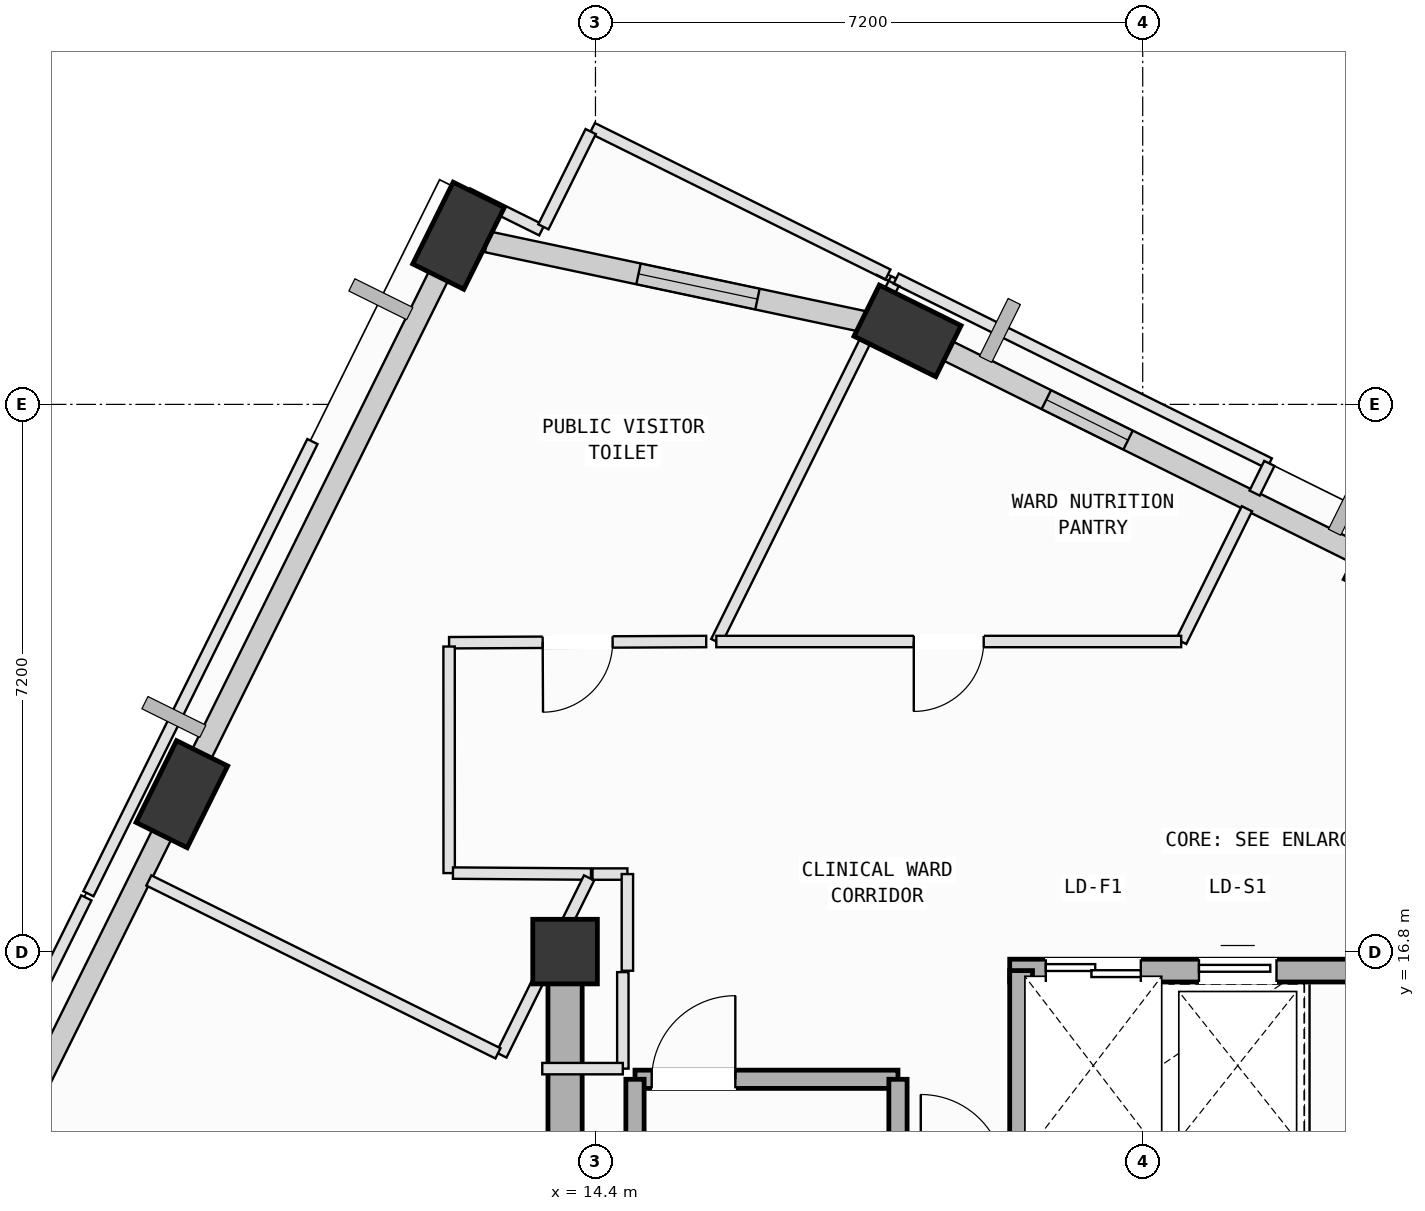
"""IFC4 building model, lengths in metres.
Left out: names, types, materials, properties, quantities, classifications, styles, units other than length and angle.
Written with IfcOpenShell. Run it as: python <this file> out.ifc"""

import sys

from ifc_helpers import new_model, si_unit, direction, frame, frame_2d, origin, origin_2d, place, context, subcontext, project, spatial, rectangle, extrude, element, fill, save


model = new_model("IFC4")
c1 = context("Model", 3, precision=1e-05, world=origin(), true_north=direction((0.0, 1.0)))
c2 = subcontext(c1, "Body", "Model", "MODEL_VIEW")
j1 = project(units=[si_unit("LENGTHUNIT", "METRE"), si_unit("PLANEANGLEUNIT", "RADIAN")], contexts=[c1])
p1 = place(None, origin())
s1 = spatial("IfcSite", under=j1, at=p1, CompositionType="ELEMENT")
p2 = place(p1, origin())
s2 = spatial("IfcBuilding", under=s1, at=p2, CompositionType="ELEMENT")
p3 = place(p2, frame((0.0, 0.0, 296.6)))
s3 = spatial("IfcBuildingStorey", under=s2, at=p3, CompositionType="ELEMENT", Elevation=296.6)
p4 = place(p3, frame((14.0, 16.8, 0.0), z_axis=(0.0, 0.0, 1.0), x_axis=(1.0, 0.0, 0.0)))
e1 = element("IfcColumn", 1, at=p4, inside=s3, PredefinedType="COLUMN", context=c2, shape_type="SweptSolid", body=[
    extrude(rectangle(XDim=0.85, YDim=0.85, at=origin_2d()), origin(), (0.0, 0.0, 1.0), 4.0),
])
p5 = place(p3, frame((18.506, 24.967, 0.002), z_axis=(-0.000182915695, -0.062435223748, 0.998049001491), x_axis=(-0.894797781835, 0.445610775748, 0.027712202396)))
e2 = element("IfcColumn", 2, at=p5, inside=s3, PredefinedType="COLUMN", context=c2, shape_type="SweptSolid", body=[
    extrude(rectangle(XDim=1.2, YDim=0.75, at=origin_2d()), origin(), (0.0, 0.0, 1.0), 4.004),
])
p6 = place(p3, frame((12.598, 26.219, 0.002), z_axis=(-0.005173080286, -0.086786029269, 0.996213543556), x_axis=(0.496184468369, 0.864714681818, 0.077906947039)))
e3 = element("IfcColumn", 3, at=p6, inside=s3, PredefinedType="COLUMN", context=c2, shape_type="SweptSolid", body=[
    extrude(rectangle(XDim=1.2, YDim=0.75, at=origin_2d()), origin(), (0.0, 0.0, 1.0), 4.011),
])
p7 = place(p3, frame((8.958, 18.871, 0.002), z_axis=(0.025274890119, -0.101342588264, 0.994530471998), x_axis=(0.215002324818, 0.972118317881, 0.093594745379)))
e4 = element("IfcColumn", 4, at=p7, inside=s3, PredefinedType="COLUMN", context=c2, shape_type="SweptSolid", body=[
    extrude(rectangle(XDim=1.2, YDim=0.75, at=origin_2d()), origin(), (0.0, 0.0, 1.0), 4.018),
])
p8 = place(p3, frame((18.897, 24.773, 0.0), z_axis=(0.0, 0.0, 1.0), x_axis=(0.896108153049, -0.443835755702, 0.0)))
e5 = element("IfcWall", 5, at=p8, inside=s3, PredefinedType="SOLIDWALL", context=c2, shape_type="SweptSolid", body=[
    extrude(rectangle(XDim=6.424, YDim=0.28, at=frame_2d((3.212, 0.0))), origin(), (0.0, 0.0, 1.0), 3.265),
])
p9 = place(p8, frame((1.601, 0.0, 0.75)))
e6 = element("IfcOpeningElement", 6, at=p9, cuts=e5, PredefinedType="OPENING", context=c2, shape_type="SweptSolid", body=[
    extrude(rectangle(XDim=1.2, YDim=1.75, at=frame_2d((0.6, 0.875))), frame((0.0, 0.15, 0.0), z_axis=(0.0, -1.0, 0.0), x_axis=(1.0, 0.0, 0.0)), (0.0, 0.0, 1.0), 0.3),
])
p10 = place(p3, frame((12.974, 26.14, 0.0), z_axis=(0.0, 0.0, 1.0), x_axis=(0.978261588189, -0.207374697284, 0.0)))
e7 = element("IfcWall", 7, at=p10, inside=s3, PredefinedType="SOLIDWALL", context=c2, shape_type="SweptSolid", body=[
    extrude(rectangle(XDim=5.302, YDim=0.28, at=frame_2d((2.651, 0.0))), origin(), (0.0, 0.0, 1.0), 3.265),
])
p11 = place(p10, frame((2.037, 0.0, 0.75)))
e8 = element("IfcOpeningElement", 8, at=p11, cuts=e7, PredefinedType="OPENING", context=c2, shape_type="SweptSolid", body=[
    extrude(rectangle(XDim=1.6, YDim=1.95, at=frame_2d((0.8, 0.975))), frame((0.0, 0.15, 0.0), z_axis=(0.0, -1.0, 0.0), x_axis=(1.0, 0.0, 0.0)), (0.0, 0.0, 1.0), 0.3),
])
p12 = place(p3, frame((9.053, 19.062, 0.0), z_axis=(0.0, 0.0, 1.0), x_axis=(0.443860814278, 0.896095741285, 0.0)))
e9 = element("IfcWall", 9, at=p12, inside=s3, PredefinedType="SOLIDWALL", context=c2, shape_type="SweptSolid", body=[
    extrude(rectangle(XDim=7.434, YDim=0.28, at=frame_2d((3.717, 0.0))), origin(), (0.0, 0.0, 1.0), 3.265),
])
p13 = place(p3, frame((5.399, 11.686, 0.0), z_axis=(0.0, 0.0, 1.0), x_axis=(0.443844166841, 0.896103987025, 0.0)))
e10 = element("IfcWall", 10, at=p13, inside=s3, PredefinedType="SOLIDWALL", context=c2, shape_type="SweptSolid", body=[
    extrude(rectangle(XDim=7.485, YDim=0.28, at=frame_2d((3.742, 0.0))), origin(), (0.0, 0.0, 1.0), 3.265),
])
p14 = place(p3, frame((14.92, 15.12, 0.0), z_axis=(0.0, 0.0, 1.0), x_axis=(1.0, 0.0, 0.0)))
e11 = element("IfcWall", 11, at=p14, inside=s3, PredefinedType="SOLIDWALL", context=c2, shape_type="SweptSolid", body=[
    extrude(rectangle(XDim=3.46, YDim=0.24, at=frame_2d((1.73, 0.0))), origin(), (0.0, 0.0, 1.0), 3.78),
])
p15 = place(p14, frame((0.22, 0.0, 0.0)))
e12 = element("IfcOpeningElement", 12, at=p15, cuts=e11, PredefinedType="OPENING", context=c2, shape_type="SweptSolid", body=[
    extrude(rectangle(XDim=1.1, YDim=2.15, at=frame_2d((0.55, 1.075))), frame((0.0, 0.13, 0.0), z_axis=(0.0, -1.0, 0.0), x_axis=(1.0, 0.0, 0.0)), (0.0, 0.0, 1.0), 0.26),
])
for number, where, z_axis, x_axis in (
    (13, (18.38, 15.12, 0.0), (0.0, 0.0, 1.0), (0.0, -1.0, 0.0)),
    (14, (14.92, 8.025, 0.0), (0.0, 0.0, 1.0), (0.0, 1.0, 0.0)),
):
    element("IfcWall", number, at=place(p3, frame(where, z_axis=z_axis, x_axis=x_axis)), inside=s3, PredefinedType="SOLIDWALL", context=c2, shape_type="SweptSolid", body=[
        extrude(rectangle(XDim=7.095, YDim=0.24, at=frame_2d((3.548, 0.0))), origin(), (0.0, 0.0, 1.0), 3.78),
    ])
p16 = place(p3, frame((14.0, 16.8, 0.0), z_axis=(0.0, 0.0, 1.0), x_axis=(0.0, -1.0, 0.0)))
e15 = element("IfcWall", 15, at=p16, inside=s3, PredefinedType="SHEAR", context=c2, shape_type="SweptSolid", body=[
    extrude(rectangle(XDim=9.0, YDim=0.45, at=frame_2d((4.5, 0.0))), origin(), (0.0, 0.0, 1.0), 3.78),
])
p17 = place(p3, frame((19.85, 16.55, 0.0), z_axis=(0.0, 0.0, 1.0), x_axis=(1.0, 0.0, 0.0)))
e16 = element("IfcWall", 16, at=p17, inside=s3, PredefinedType="SOLIDWALL", context=c2, shape_type="SweptSolid", body=[
    extrude(rectangle(XDim=4.525, YDim=0.3, at=frame_2d((2.262, 0.0))), origin(), (0.0, 0.0, 1.0), 3.78),
])
p18 = place(p17, frame((0.475, 0.0, 0.0)))
e17 = element("IfcOpeningElement", 17, at=p18, cuts=e16, PredefinedType="OPENING", context=c2, shape_type="SweptSolid", body=[
    extrude(rectangle(XDim=1.25, YDim=2.18, at=frame_2d((0.625, 1.09))), frame((0.0, 0.16, 0.0), z_axis=(0.0, -1.0, 0.0), x_axis=(1.0, 0.0, 0.0)), (0.0, 0.0, 1.0), 0.32),
])
p19 = place(p17, frame((2.49, 0.0, 0.0)))
e18 = element("IfcOpeningElement", 18, at=p19, cuts=e16, PredefinedType="OPENING", context=c2, shape_type="SweptSolid", body=[
    extrude(rectangle(XDim=1.02, YDim=2.12, at=frame_2d((0.51, 1.06))), frame((0.0, 0.16, 0.0), z_axis=(0.0, -1.0, 0.0), x_axis=(1.0, 0.0, 0.0)), (0.0, 0.0, 1.0), 0.32),
])
p20 = place(p3, frame((20.0, 13.82, 0.0), z_axis=(0.0, 0.0, 1.0), x_axis=(0.0, 1.0, 0.0)))
e19 = element("IfcWall", 19, at=p20, inside=s3, PredefinedType="SOLIDWALL", context=c2, shape_type="SweptSolid", body=[
    extrude(rectangle(XDim=2.73, YDim=0.3, at=frame_2d((1.365, 0.0))), origin(), (0.0, 0.0, 1.0), 3.78),
])
p21 = place(p3, frame((15.99, 20.88, 0.0), z_axis=(0.0, 0.0, 1.0), x_axis=(0.443946777105, 0.896053156402, 0.0)))
e20 = element("IfcWall", 20, at=p21, inside=s3, PredefinedType="PARTITIONING", context=c2, shape_type="SweptSolid", body=[
    extrude(rectangle(XDim=4.548, YDim=0.15, at=frame_2d((2.274, 0.0))), origin(), (0.0, 0.0, 1.0), 3.78),
])
p22 = place(p3, frame((18.114, 25.168, 0.0), z_axis=(0.0, 0.0, 1.0), x_axis=(0.444877698977, 0.895591331442, 0.0)))
e21 = element("IfcWall", 21, at=p22, inside=s3, PredefinedType="PARTITIONING", context=c2, shape_type="SweptSolid", body=[
    extrude(rectangle(XDim=0.544, YDim=0.15, at=frame_2d((0.272, 0.0))), origin(), (0.0, 0.0, 1.0), 3.78),
])
p23 = place(p3, frame((18.356, 25.655, 0.0), z_axis=(0.0, 0.0, 1.0), x_axis=(0.896096194599, -0.443859899095, 0.0)))
e22 = element("IfcWall", 22, at=p23, inside=s3, PredefinedType="PARTITIONING", context=c2, shape_type="SweptSolid", body=[
    extrude(rectangle(XDim=5.479, YDim=0.15, at=frame_2d((2.74, 0.0))), origin(), (0.0, 0.0, 1.0), 3.78),
])
p24 = place(p3, frame((23.266, 23.223, 0.0), z_axis=(0.0, 0.0, 1.0), x_axis=(-0.443843724004, -0.896104206364, 0.0)))
e23 = element("IfcWall", 23, at=p24, inside=s3, PredefinedType="PARTITIONING", context=c2, shape_type="SweptSolid", body=[
    extrude(rectangle(XDim=0.435, YDim=0.15, at=frame_2d((0.218, 0.0))), origin(), (0.0, 0.0, 1.0), 3.78),
])
p25 = place(p3, frame((22.971, 22.627, 0.0), z_axis=(0.0, 0.0, 1.0), x_axis=(-0.443703610253, -0.896173591582, 0.0)))
e24 = element("IfcWall", 24, at=p25, inside=s3, PredefinedType="PARTITIONING", context=c2, shape_type="SweptSolid", body=[
    extrude(rectangle(XDim=1.949, YDim=0.15, at=frame_2d((0.975, 0.0))), origin(), (0.0, 0.0, 1.0), 3.78),
])
p26 = place(p3, frame((22.106, 20.88, 0.0), z_axis=(0.0, 0.0, 1.0), x_axis=(-1.0, 0.0, 0.0)))
e25 = element("IfcWall", 25, at=p26, inside=s3, PredefinedType="PARTITIONING", context=c2, shape_type="SweptSolid", body=[
    extrude(rectangle(XDim=6.116, YDim=0.15, at=frame_2d((3.058, 0.0))), origin(), (0.0, 0.0, 1.0), 3.415),
])
p27 = place(p26, frame((2.598, 0.0, 0.0)))
e26 = element("IfcOpeningElement", 26, at=p27, cuts=e25, PredefinedType="OPENING", context=c2, shape_type="SweptSolid", body=[
    extrude(rectangle(XDim=0.92, YDim=2.1, at=frame_2d((0.46, 1.05))), frame((0.0, 0.085, 0.0), z_axis=(0.0, -1.0, 0.0), x_axis=(1.0, 0.0, 0.0)), (0.0, 0.0, 1.0), 0.17),
])
p28 = place(p3, frame((14.359, 27.635, 0.0), z_axis=(0.0, 0.0, 1.0), x_axis=(0.896041284566, -0.443970738172, 0.0)))
e27 = element("IfcWall", 27, at=p28, inside=s3, PredefinedType="PARTITIONING", context=c2, shape_type="SweptSolid", body=[
    extrude(rectangle(XDim=4.34, YDim=0.15, at=frame_2d((2.17, 0.0))), origin(), (0.0, 0.0, 1.0), 3.78),
])
p29 = place(p3, frame((15.857, 20.88, 0.0), z_axis=(0.0, 0.0, 1.0), x_axis=(-0.999988996932, -0.004691056928, 0.0)))
e28 = element("IfcWall", 28, at=p29, inside=s3, PredefinedType="PARTITIONING", context=c2, shape_type="SweptSolid", body=[
    extrude(rectangle(XDim=3.383, YDim=0.15, at=frame_2d((1.691, 0.0))), origin(), (0.0, 0.0, 1.0), 3.415),
])
p30 = place(p29, frame((1.231, 0.0, 0.0)))
e29 = element("IfcOpeningElement", 29, at=p30, cuts=e28, PredefinedType="OPENING", context=c2, shape_type="SweptSolid", body=[
    extrude(rectangle(XDim=0.92, YDim=2.1, at=frame_2d((0.46, 1.05))), frame((0.0, 0.085, 0.0), z_axis=(0.0, -1.0, 0.0), x_axis=(1.0, 0.0, 0.0)), (0.0, 0.0, 1.0), 0.17),
])
p31 = place(p3, frame((12.474, 20.814, 0.0), z_axis=(0.0, 0.0, 1.0), x_axis=(0.00032760031, -0.999999946339, 0.0)))
e30 = element("IfcWall", 30, at=p31, inside=s3, PredefinedType="PARTITIONING", context=c2, shape_type="SweptSolid", body=[
    extrude(rectangle(XDim=2.981, YDim=0.15, at=frame_2d((1.49, 0.0))), origin(), (0.0, 0.0, 1.0), 3.415),
])
p32 = place(p3, frame((12.525, 17.833, 0.0), z_axis=(0.0, 0.0, 1.0), x_axis=(0.999974620907, -0.007124432707, 0.0)))
e31 = element("IfcWall", 31, at=p32, inside=s3, PredefinedType="PARTITIONING", context=c2, shape_type="SweptSolid", body=[
    extrude(rectangle(XDim=1.816, YDim=0.15, at=frame_2d((0.908, 0.0))), origin(), (0.0, 0.0, 1.0), 3.78),
])
p33 = place(p3, frame((14.316, 17.77, 0.0), z_axis=(0.0, 0.0, 1.0), x_axis=(-0.443525386391, -0.896261809756, 0.0)))
e32 = element("IfcWall", 32, at=p33, inside=s3, PredefinedType="PARTITIONING", context=c2, shape_type="SweptSolid", body=[
    extrude(rectangle(XDim=0.875, YDim=0.15, at=frame_2d((0.438, 0.0))), origin(), (0.0, 0.0, 1.0), 3.78),
])
p34 = place(p3, frame((13.8, 16.727, 0.0), z_axis=(0.0, 0.0, 1.0), x_axis=(-0.443813405685, -0.8961192225, 0.0)))
e33 = element("IfcWall", 33, at=p34, inside=s3, PredefinedType="PARTITIONING", context=c2, shape_type="SweptSolid", body=[
    extrude(rectangle(XDim=1.438, YDim=0.15, at=frame_2d((0.719, 0.0))), origin(), (0.0, 0.0, 1.0), 3.78),
])
p35 = place(p3, frame((13.117, 15.461, 0.0), z_axis=(0.0, 0.0, 1.0), x_axis=(-0.896088072768, 0.443876295653, 0.0)))
e34 = element("IfcWall", 34, at=p35, inside=s3, PredefinedType="PARTITIONING", context=c2, shape_type="SweptSolid", body=[
    extrude(rectangle(XDim=5.126, YDim=0.15, at=frame_2d((2.563, 0.0))), origin(), (0.0, 0.0, 1.0), 3.78),
])
p36 = place(p3, frame((8.551, 18.477, 0.0), z_axis=(0.0, 0.0, 1.0), x_axis=(0.444076193539, 0.895989025788, 0.0)))
e35 = element("IfcWall", 35, at=p36, inside=s3, PredefinedType="PARTITIONING", context=c2, shape_type="SweptSolid", body=[
    extrude(rectangle(XDim=0.748, YDim=0.15, at=frame_2d((0.374, 0.0))), origin(), (0.0, 0.0, 1.0), 3.78),
])
p37 = place(p3, frame((12.183, 25.809, 0.0), z_axis=(0.0, 0.0, 1.0), x_axis=(0.44357801669, 0.896235763128, 0.0)))
e36 = element("IfcWall", 36, at=p37, inside=s3, PredefinedType="PARTITIONING", context=c2, shape_type="SweptSolid", body=[
    extrude(rectangle(XDim=1.103, YDim=0.15, at=frame_2d((0.551, 0.0))), origin(), (0.0, 0.0, 1.0), 3.265),
])
p38 = place(p3, frame((12.717, 26.775, 0.0), z_axis=(0.0, 0.0, 1.0), x_axis=(0.895945868345, -0.444163259395, 0.0)))
e37 = element("IfcWall", 37, at=p38, inside=s3, PredefinedType="PARTITIONING", context=c2, shape_type="SweptSolid", body=[
    extrude(rectangle(XDim=1.089, YDim=0.15, at=frame_2d((0.545, 0.0))), origin(), (0.0, 0.0, 1.0), 3.78),
])
p39 = place(p3, frame((13.715, 26.336, 0.0), z_axis=(0.0, 0.0, 1.0), x_axis=(0.444211302354, 0.895922049545, 0.0)))
e38 = element("IfcWall", 38, at=p39, inside=s3, PredefinedType="PARTITIONING", context=c2, shape_type="SweptSolid", body=[
    extrude(rectangle(XDim=1.4, YDim=0.15, at=frame_2d((0.7, 0.0))), origin(), (0.0, 0.0, 1.0), 3.78),
])
p40 = place(p3, frame((4.755, 11.557, 0.0), z_axis=(0.0, 0.0, 1.0), x_axis=(0.443827732057, 0.896112127056, 0.0)))
e39 = element("IfcWall", 39, at=p40, inside=s3, PredefinedType="PARTITIONING", context=c2, shape_type="SweptSolid", body=[
    extrude(rectangle(XDim=6.64, YDim=0.15, at=frame_2d((3.32, 0.0))), origin(), (0.0, 0.0, 1.0), 3.78),
])
p41 = place(p3, frame((14.76, 16.53, 0.0), z_axis=(0.0, 0.0, 1.0), x_axis=(0.0, -1.0, 0.0)))
e40 = element("IfcWall", 40, at=p41, inside=s3, PredefinedType="PARTITIONING", context=c2, shape_type="SweptSolid", body=[
    extrude(rectangle(XDim=1.27, YDim=0.15, at=frame_2d((0.635, 0.0))), origin(), (0.0, 0.0, 1.0), 3.78),
])
p42 = place(p3, frame((14.76, 15.26, 0.0), z_axis=(0.0, 0.0, 1.0), x_axis=(-1.0, 0.0, 0.0)))
e41 = element("IfcWall", 41, at=p42, inside=s3, PredefinedType="PARTITIONING", context=c2, shape_type="SweptSolid", body=[
    extrude(rectangle(XDim=1.06, YDim=0.15, at=frame_2d((0.53, 0.0))), origin(), (0.0, 0.0, 1.0), 3.78),
])
p43 = place(p3, frame((7.729, 17.561, 0.0), z_axis=(0.0, 0.0, 1.0), x_axis=(0.443842355867, 0.896104884006, 0.0)))
e42 = element("IfcWall", 42, at=p43, inside=s3, PredefinedType="PARTITIONING", context=c2, shape_type="SweptSolid", body=[
    extrude(rectangle(XDim=6.64, YDim=0.15, at=frame_2d((3.32, 0.0))), origin(), (0.0, 0.0, 1.0), 3.78),
])
p44 = place(p3, frame((14.361, 17.82, 0.0), z_axis=(0.0, 0.0, 1.0), x_axis=(1.0, 0.0, 0.0)))
e43 = element("IfcWall", 43, at=p44, inside=s3, PredefinedType="PARTITIONING", context=c2, shape_type="SweptSolid", body=[
    extrude(rectangle(XDim=0.459, YDim=0.15, at=frame_2d((0.229, 0.0))), origin(), (0.0, 0.0, 1.0), 3.78),
])
p45 = place(p3, frame((14.82, 17.82, 0.0), z_axis=(0.0, 0.0, 1.0), x_axis=(0.0, -1.0, 0.0)))
e44 = element("IfcWall", 44, at=p45, inside=s3, PredefinedType="PARTITIONING", context=c2, shape_type="SweptSolid", body=[
    extrude(rectangle(XDim=1.272, YDim=0.15, at=frame_2d((0.636, 0.0))), origin(), (0.0, 0.0, 1.0), 3.78),
])
p46 = place(p9, origin())
e45 = element("IfcWindow", 45, at=p46, inside=s3, PartitioningType="SINGLE_PANEL", PredefinedType="WINDOW", context=c2, shape_type="SweptSolid", body=[
    extrude(rectangle(XDim=1.2, YDim=1.75, at=frame_2d((0.6, 0.875))), frame((0.0, 0.03, 0.0), z_axis=(0.0, -1.0, 0.0), x_axis=(1.0, 0.0, 0.0)), (0.0, 0.0, 1.0), 0.06),
])
fill(e6, e45)
p47 = place(p11, origin())
e46 = element("IfcWindow", 46, at=p47, inside=s3, PartitioningType="SINGLE_PANEL", PredefinedType="WINDOW", context=c2, shape_type="SweptSolid", body=[
    extrude(rectangle(XDim=1.6, YDim=1.95, at=frame_2d((0.8, 0.975))), frame((0.0, 0.03, 0.0), z_axis=(0.0, -1.0, 0.0), x_axis=(1.0, 0.0, 0.0)), (0.0, 0.0, 1.0), 0.06),
])
fill(e8, e46)
p48 = place(p15, origin())
e47 = element("IfcDoor", 47, at=p48, inside=s3, OperationType="SINGLE_SWING_RIGHT", PredefinedType="DOOR", context=c2, shape_type="SweptSolid", body=[
    extrude(rectangle(XDim=1.1, YDim=2.15, at=frame_2d((0.55, 1.075))), frame((0.0, 0.025, 0.0), z_axis=(0.0, -1.0, 0.0), x_axis=(1.0, 0.0, 0.0)), (0.0, 0.0, 1.0), 0.05),
])
fill(e12, e47)
p49 = place(p18, origin())
e48 = element("IfcDoor", 48, at=p49, inside=s3, OperationType="DOUBLE_DOOR_SLIDING", PredefinedType="DOOR", context=c2, shape_type="SweptSolid", body=[
    extrude(rectangle(XDim=1.25, YDim=2.18, at=frame_2d((0.625, 1.09))), frame((0.0, 0.025, 0.0), z_axis=(0.0, -1.0, 0.0), x_axis=(1.0, 0.0, 0.0)), (0.0, 0.0, 1.0), 0.05),
])
fill(e17, e48)
p50 = place(p19, origin())
e49 = element("IfcDoor", 49, at=p50, inside=s3, OperationType="SLIDING_TO_LEFT", PredefinedType="DOOR", context=c2, shape_type="SweptSolid", body=[
    extrude(rectangle(XDim=1.02, YDim=2.12, at=frame_2d((0.51, 1.06))), frame((0.0, 0.025, 0.0), z_axis=(0.0, -1.0, 0.0), x_axis=(1.0, 0.0, 0.0)), (0.0, 0.0, 1.0), 0.05),
])
fill(e18, e49)
p51 = place(p27, origin())
e50 = element("IfcDoor", 50, at=p51, inside=s3, OperationType="SINGLE_SWING_RIGHT", PredefinedType="DOOR", context=c2, shape_type="SweptSolid", body=[
    extrude(rectangle(XDim=0.92, YDim=2.1, at=frame_2d((0.46, 1.05))), frame((0.0, 0.025, 0.0), z_axis=(0.0, -1.0, 0.0), x_axis=(1.0, 0.0, 0.0)), (0.0, 0.0, 1.0), 0.05),
])
fill(e26, e50)
p52 = place(p30, origin())
e51 = element("IfcDoor", 51, at=p52, inside=s3, OperationType="SINGLE_SWING_RIGHT", PredefinedType="DOOR", context=c2, shape_type="SweptSolid", body=[
    extrude(rectangle(XDim=0.92, YDim=2.1, at=frame_2d((0.46, 1.05))), frame((0.0, 0.025, 0.0), z_axis=(0.0, -1.0, 0.0), x_axis=(1.0, 0.0, 0.0)), (0.0, 0.0, 1.0), 0.05),
])
fill(e29, e51)
save(model, sys.argv[1])
